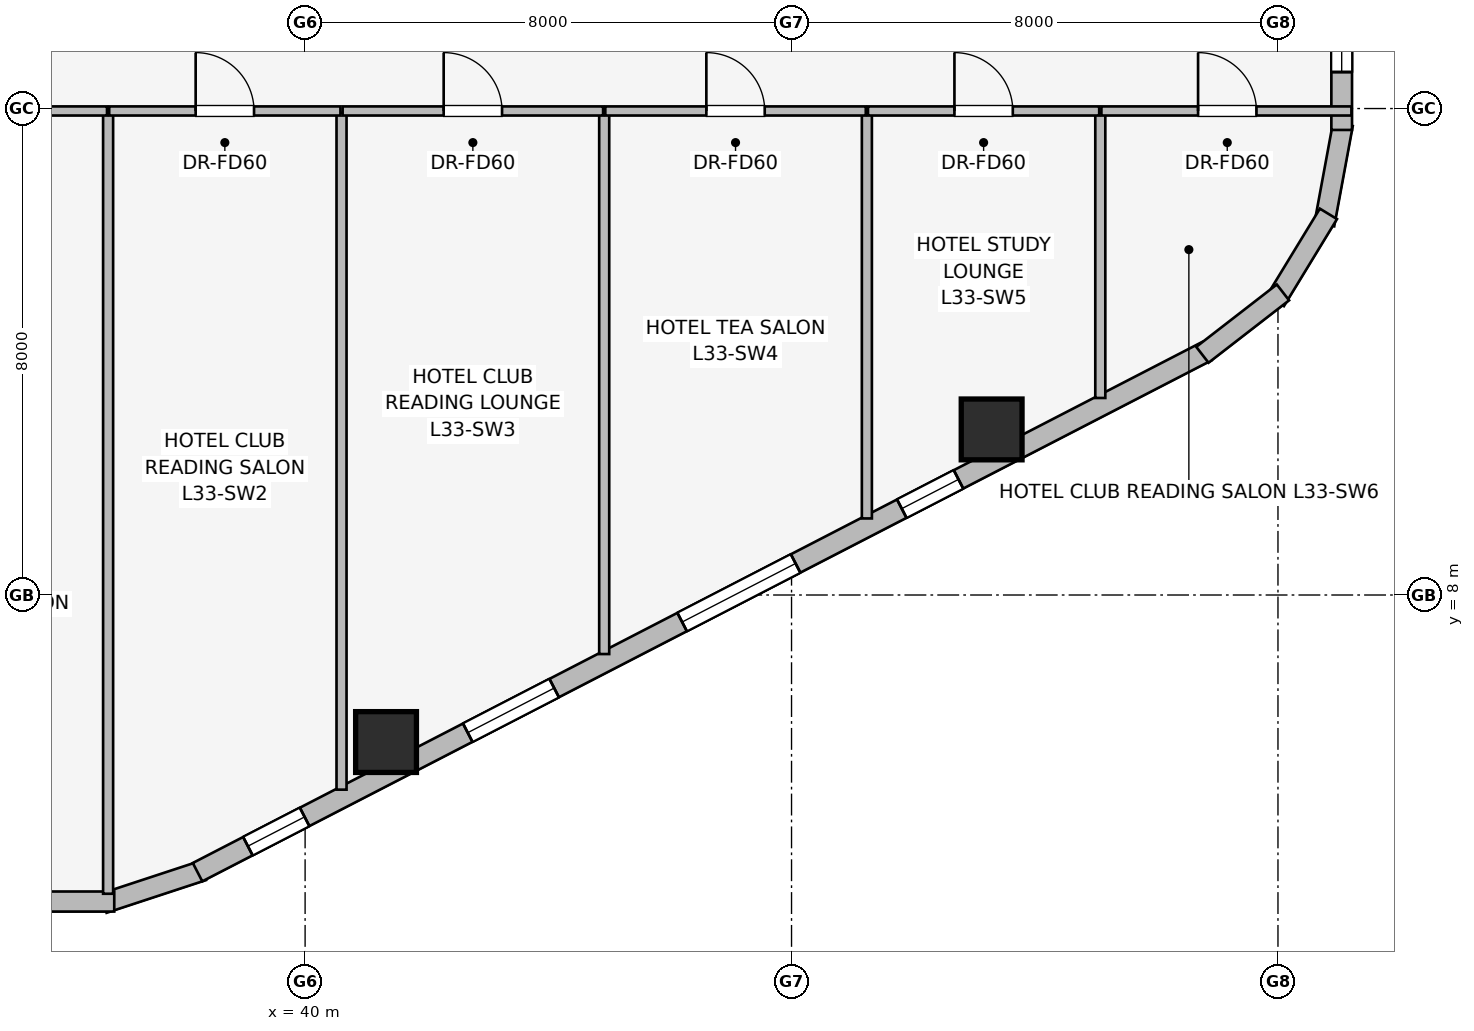
"""IFC4 building model, lengths in metres.
Left out: names, types, materials, properties, quantities, classifications, styles, units other than length and angle.
Written with IfcOpenShell. Run it as: python <this file> out.ifc"""

import sys

from ifc_helpers import new_model, si_unit, direction, frame, frame_2d, origin, origin_2d, place, context, subcontext, project, spatial, rectangle, extrude, element, fill, save


model = new_model("IFC4")
c1 = context("Model", 3, precision=1e-05, world=origin(), true_north=direction((0.0, 1.0)))
c2 = subcontext(c1, "Body", "Model", "MODEL_VIEW")
j1 = project(units=[si_unit("LENGTHUNIT", "METRE"), si_unit("PLANEANGLEUNIT", "RADIAN")], contexts=[c1])
p1 = place(None, origin())
s1 = spatial("IfcSite", under=j1, at=p1, CompositionType="ELEMENT")
p2 = place(p1, origin())
s2 = spatial("IfcBuilding", under=s1, at=p2, CompositionType="ELEMENT")
p3 = place(p2, frame((0.0, 0.0, 125.7)))
s3 = spatial("IfcBuildingStorey", under=s2, at=p3, CompositionType="ELEMENT", Elevation=125.7)
for number, where, z_axis, x_axis in (
    (1, (41.331, 5.582, 0.0), (0.0, 0.0, 1.0), (1.0, 0.0, 0.0)),
    (2, (51.291, 10.723, 0.0), (0.0, 0.0, 1.0), (1.0, 0.0, 0.0)),
):
    element("IfcColumn", number, at=place(p3, frame(where, z_axis=z_axis, x_axis=x_axis)), inside=s3, PredefinedType="COLUMN", context=c2, shape_type="SweptSolid", body=[
        extrude(rectangle(XDim=1.0, YDim=1.0, at=origin_2d()), origin(), (0.0, 0.0, 1.0), 3.45),
    ])
for number, where, z_axis, x_axis in (
    (3, (38.319, 3.468, 0.0), (0.0, 0.0, 1.0), (-0.95, -0.312, 0.0)),
    (4, (36.861, 2.959, 0.0), (0.0, 0.0, 1.0), (-1.0, 0.0, 0.0)),
):
    element("IfcWall", number, at=place(p3, frame(where, z_axis=z_axis, x_axis=x_axis)), inside=s3, PredefinedType="STANDARD", context=c2, shape_type="SweptSolid", body=[
        extrude(rectangle(XDim=1.722, YDim=0.33, at=frame_2d((0.861, 0.0))), origin(), (0.0, 0.0, 1.0), 3.19),
    ])
p4 = place(p3, frame((54.831, 12.01, 0.0), z_axis=(0.0, 0.0, 1.0), x_axis=(-0.888613612362, -0.458656568606, 0.0)))
e5 = element("IfcWall", 5, at=p4, inside=s3, PredefinedType="STANDARD", context=c2, shape_type="SweptSolid", body=[
    extrude(rectangle(XDim=18.681, YDim=0.34, at=frame_2d((9.34, 0.0))), origin(), (0.0, 0.0, 1.0), 3.19),
])
p5 = place(p4, frame((4.597, 0.0, 0.75)))
e6 = element("IfcOpeningElement", 6, at=p5, cuts=e5, PredefinedType="OPENING", context=c2, shape_type="SweptSolid", body=[
    extrude(rectangle(XDim=1.05, YDim=1.4, at=frame_2d((0.525, 0.7))), frame((0.0, 0.18, 0.0), z_axis=(0.0, -1.0, 0.0), x_axis=(1.0, 0.0, 0.0)), (0.0, 0.0, 1.0), 0.36),
])
p6 = place(p4, frame((7.612, 0.0, 0.75)))
e7 = element("IfcOpeningElement", 7, at=p6, cuts=e5, PredefinedType="OPENING", context=c2, shape_type="SweptSolid", body=[
    extrude(rectangle(XDim=2.1, YDim=1.5, at=frame_2d((1.05, 0.75))), frame((0.0, 0.18, 0.0), z_axis=(0.0, -1.0, 0.0), x_axis=(1.0, 0.0, 0.0)), (0.0, 0.0, 1.0), 0.36),
])
p7 = place(p4, frame((12.08, 0.0, 0.75)))
e8 = element("IfcOpeningElement", 8, at=p7, cuts=e5, PredefinedType="OPENING", context=c2, shape_type="SweptSolid", body=[
    extrude(rectangle(XDim=1.6, YDim=1.55, at=frame_2d((0.8, 0.775))), frame((0.0, 0.18, 0.0), z_axis=(0.0, -1.0, 0.0), x_axis=(1.0, 0.0, 0.0)), (0.0, 0.0, 1.0), 0.36),
])
p8 = place(p4, frame((16.699, 0.0, 0.75)))
e9 = element("IfcOpeningElement", 9, at=p8, cuts=e5, PredefinedType="OPENING", context=c2, shape_type="SweptSolid", body=[
    extrude(rectangle(XDim=1.05, YDim=1.4, at=frame_2d((0.525, 0.7))), frame((0.0, 0.18, 0.0), z_axis=(0.0, -1.0, 0.0), x_axis=(1.0, 0.0, 0.0)), (0.0, 0.0, 1.0), 0.36),
])
p9 = place(p3, frame((57.068, 15.742, 0.0), z_axis=(0.0, 0.0, 1.0), x_axis=(-0.181984991895, -0.983301308209, 0.0)))
e10 = element("IfcWall", 10, at=p9, inside=s3, PredefinedType="STANDARD", context=c2, shape_type="SweptSolid", body=[
    extrude(rectangle(XDim=1.677, YDim=0.33, at=frame_2d((0.838, 0.0))), origin(), (0.0, 0.0, 1.0), 3.19),
])
p10 = place(p3, frame((56.83, 14.268, 0.0), z_axis=(0.0, 0.0, 1.0), x_axis=(-0.520519429557, -0.853849824883, 0.0)))
e11 = element("IfcWall", 11, at=p10, inside=s3, PredefinedType="STANDARD", context=c2, shape_type="SweptSolid", body=[
    extrude(rectangle(XDim=1.677, YDim=0.33, at=frame_2d((0.839, 0.0))), origin(), (0.0, 0.0, 1.0), 3.19),
])
p11 = place(p3, frame((56.082, 12.976, 0.0), z_axis=(0.0, 0.0, 1.0), x_axis=(-0.790621329885, -0.612305408053, 0.0)))
e12 = element("IfcWall", 12, at=p11, inside=s3, PredefinedType="STANDARD", context=c2, shape_type="SweptSolid", body=[
    extrude(rectangle(XDim=1.676, YDim=0.33, at=frame_2d((0.838, 0.0))), origin(), (0.0, 0.0, 1.0), 3.19),
])
p12 = place(p3, frame((57.048, 32.352, 0.0), z_axis=(0.0, 0.0, 1.0), x_axis=(0.0, -1.0, 0.0)))
e13 = element("IfcWall", 13, at=p12, inside=s3, PredefinedType="STANDARD", context=c2, shape_type="SweptSolid", body=[
    extrude(rectangle(XDim=16.704, YDim=0.34, at=frame_2d((8.352, 0.0))), origin(), (0.0, 0.0, 1.0), 3.19),
])
p13 = place(p12, frame((8.452, 0.0, 0.0)))
e14 = element("IfcOpeningElement", 14, at=p13, cuts=e13, PredefinedType="OPENING", context=c2, shape_type="SweptSolid", body=[
    extrude(rectangle(XDim=1.1, YDim=2.04, at=frame_2d((0.55, 1.02))), frame((0.0, 0.18, 0.0), z_axis=(0.0, -1.0, 0.0), x_axis=(1.0, 0.0, 0.0)), (0.0, 0.0, 1.0), 0.36),
])
p14 = place(p12, frame((0.992, 0.0, 0.75)))
e15 = element("IfcOpeningElement", 15, at=p14, cuts=e13, PredefinedType="OPENING", context=c2, shape_type="SweptSolid", body=[
    extrude(rectangle(XDim=1.05, YDim=1.4, at=frame_2d((0.525, 0.7))), frame((0.0, 0.18, 0.0), z_axis=(0.0, -1.0, 0.0), x_axis=(1.0, 0.0, 0.0)), (0.0, 0.0, 1.0), 0.36),
])
p15 = place(p12, frame((4.935, 0.0, 0.75)))
e16 = element("IfcOpeningElement", 16, at=p15, cuts=e13, PredefinedType="OPENING", context=c2, shape_type="SweptSolid", body=[
    extrude(rectangle(XDim=2.1, YDim=1.5, at=frame_2d((1.05, 0.75))), frame((0.0, 0.18, 0.0), z_axis=(0.0, -1.0, 0.0), x_axis=(1.0, 0.0, 0.0)), (0.0, 0.0, 1.0), 0.36),
])
p16 = place(p12, frame((10.497, 0.0, 0.75)))
e17 = element("IfcOpeningElement", 17, at=p16, cuts=e13, PredefinedType="OPENING", context=c2, shape_type="SweptSolid", body=[
    extrude(rectangle(XDim=1.6, YDim=1.55, at=frame_2d((0.8, 0.775))), frame((0.0, 0.18, 0.0), z_axis=(0.0, -1.0, 0.0), x_axis=(1.0, 0.0, 0.0)), (0.0, 0.0, 1.0), 0.36),
])
p17 = place(p12, frame((14.702, 0.0, 0.75)))
e18 = element("IfcOpeningElement", 18, at=p17, cuts=e13, PredefinedType="OPENING", context=c2, shape_type="SweptSolid", body=[
    extrude(rectangle(XDim=1.05, YDim=1.4, at=frame_2d((0.525, 0.7))), frame((0.0, 0.18, 0.0), z_axis=(0.0, -1.0, 0.0), x_axis=(1.0, 0.0, 0.0)), (0.0, 0.0, 1.0), 0.36),
])
p18 = place(p3, frame((36.76, 3.087, 0.0), z_axis=(0.0, 0.0, 1.0), x_axis=(0.0, 1.0, 0.0)))
e19 = element("IfcWall", 19, at=p18, inside=s3, PredefinedType="PARTITIONING", context=c2, shape_type="SweptSolid", body=[
    extrude(rectangle(XDim=12.843, YDim=0.165, at=frame_2d((6.421, 0.0))), origin(), (0.0, 0.0, 1.0), 3.19),
])
p19 = place(p3, frame((40.599, 4.799, 0.0), z_axis=(0.0, 0.0, 1.0), x_axis=(0.0, 1.0, 0.0)))
e20 = element("IfcWall", 20, at=p19, inside=s3, PredefinedType="PARTITIONING", context=c2, shape_type="SweptSolid", body=[
    extrude(rectangle(XDim=11.131, YDim=0.165, at=frame_2d((5.565, 0.0))), origin(), (0.0, 0.0, 1.0), 2.42),
])
p20 = place(p3, frame((44.919, 7.029, 0.0), z_axis=(0.0, 0.0, 1.0), x_axis=(0.0, 1.0, 0.0)))
e21 = element("IfcWall", 21, at=p20, inside=s3, PredefinedType="PARTITIONING", context=c2, shape_type="SweptSolid", body=[
    extrude(rectangle(XDim=8.901, YDim=0.165, at=frame_2d((4.45, 0.0))), origin(), (0.0, 0.0, 1.0), 3.19),
])
p21 = place(p3, frame((49.239, 9.259, 0.0), z_axis=(0.0, 0.0, 1.0), x_axis=(0.0, 1.0, 0.0)))
e22 = element("IfcWall", 22, at=p21, inside=s3, PredefinedType="PARTITIONING", context=c2, shape_type="SweptSolid", body=[
    extrude(rectangle(XDim=6.671, YDim=0.165, at=frame_2d((3.335, 0.0))), origin(), (0.0, 0.0, 1.0), 3.19),
])
p22 = place(p3, frame((53.078, 11.24, 0.0), z_axis=(0.0, 0.0, 1.0), x_axis=(0.0, 1.0, 0.0)))
e23 = element("IfcWall", 23, at=p22, inside=s3, PredefinedType="PARTITIONING", context=c2, shape_type="SweptSolid", body=[
    extrude(rectangle(XDim=4.69, YDim=0.165, at=frame_2d((2.345, 0.0))), origin(), (0.0, 0.0, 1.0), 3.19),
])
p23 = place(p3, frame((32.85, 15.96, 0.0), z_axis=(0.0, 0.0, 1.0), x_axis=(1.0, 0.0, 0.0)))
e24 = element("IfcWall", 24, at=p23, inside=s3, PredefinedType="PARTITIONING", context=c2, shape_type="SweptSolid", body=[
    extrude(rectangle(XDim=3.892, YDim=0.15, at=frame_2d((1.946, 0.0))), origin(), (0.0, 0.0, 1.0), 3.19),
])
p24 = place(p23, frame((1.466, 0.0, 0.0)))
e25 = element("IfcOpeningElement", 25, at=p24, cuts=e24, PredefinedType="OPENING", context=c2, shape_type="SweptSolid", body=[
    extrude(rectangle(XDim=0.96, YDim=2.0, at=frame_2d((0.48, 1.0))), frame((0.0, 0.085, 0.0), z_axis=(0.0, -1.0, 0.0), x_axis=(1.0, 0.0, 0.0)), (0.0, 0.0, 1.0), 0.17),
])
p25 = place(p3, frame((36.778, 15.96, 0.0), z_axis=(0.0, 0.0, 1.0), x_axis=(1.0, 0.0, 0.0)))
e26 = element("IfcWall", 26, at=p25, inside=s3, PredefinedType="PARTITIONING", context=c2, shape_type="SweptSolid", body=[
    extrude(rectangle(XDim=3.803, YDim=0.15, at=frame_2d((1.901, 0.0))), origin(), (0.0, 0.0, 1.0), 3.19),
])
p26 = place(p25, frame((1.422, 0.0, 0.0)))
e27 = element("IfcOpeningElement", 27, at=p26, cuts=e26, PredefinedType="OPENING", context=c2, shape_type="SweptSolid", body=[
    extrude(rectangle(XDim=0.96, YDim=2.0, at=frame_2d((0.48, 1.0))), frame((0.0, 0.085, 0.0), z_axis=(0.0, -1.0, 0.0), x_axis=(1.0, 0.0, 0.0)), (0.0, 0.0, 1.0), 0.17),
])
p27 = place(p3, frame((40.617, 15.96, 0.0), z_axis=(0.0, 0.0, 1.0), x_axis=(1.0, 0.0, 0.0)))
e28 = element("IfcWall", 28, at=p27, inside=s3, PredefinedType="PARTITIONING", context=c2, shape_type="SweptSolid", body=[
    extrude(rectangle(XDim=4.284, YDim=0.15, at=frame_2d((2.142, 0.0))), origin(), (0.0, 0.0, 1.0), 3.19),
])
p28 = place(p27, frame((1.662, 0.0, 0.0)))
e29 = element("IfcOpeningElement", 29, at=p28, cuts=e28, PredefinedType="OPENING", context=c2, shape_type="SweptSolid", body=[
    extrude(rectangle(XDim=0.96, YDim=2.0, at=frame_2d((0.48, 1.0))), frame((0.0, 0.085, 0.0), z_axis=(0.0, -1.0, 0.0), x_axis=(1.0, 0.0, 0.0)), (0.0, 0.0, 1.0), 0.17),
])
p29 = place(p3, frame((44.937, 15.96, 0.0), z_axis=(0.0, 0.0, 1.0), x_axis=(1.0, 0.0, 0.0)))
e30 = element("IfcWall", 30, at=p29, inside=s3, PredefinedType="PARTITIONING", context=c2, shape_type="SweptSolid", body=[
    extrude(rectangle(XDim=4.284, YDim=0.15, at=frame_2d((2.142, 0.0))), origin(), (0.0, 0.0, 1.0), 3.19),
])
p30 = place(p29, frame((1.662, 0.0, 0.0)))
e31 = element("IfcOpeningElement", 31, at=p30, cuts=e30, PredefinedType="OPENING", context=c2, shape_type="SweptSolid", body=[
    extrude(rectangle(XDim=0.96, YDim=2.0, at=frame_2d((0.48, 1.0))), frame((0.0, 0.085, 0.0), z_axis=(0.0, -1.0, 0.0), x_axis=(1.0, 0.0, 0.0)), (0.0, 0.0, 1.0), 0.17),
])
p31 = place(p3, frame((49.257, 15.96, 0.0), z_axis=(0.0, 0.0, 1.0), x_axis=(1.0, 0.0, 0.0)))
e32 = element("IfcWall", 32, at=p31, inside=s3, PredefinedType="PARTITIONING", context=c2, shape_type="SweptSolid", body=[
    extrude(rectangle(XDim=3.803, YDim=0.15, at=frame_2d((1.901, 0.0))), origin(), (0.0, 0.0, 1.0), 3.19),
])
p32 = place(p31, frame((1.422, 0.0, 0.0)))
e33 = element("IfcOpeningElement", 33, at=p32, cuts=e32, PredefinedType="OPENING", context=c2, shape_type="SweptSolid", body=[
    extrude(rectangle(XDim=0.96, YDim=2.0, at=frame_2d((0.48, 1.0))), frame((0.0, 0.085, 0.0), z_axis=(0.0, -1.0, 0.0), x_axis=(1.0, 0.0, 0.0)), (0.0, 0.0, 1.0), 0.17),
])
p33 = place(p3, frame((53.096, 15.96, 0.0), z_axis=(0.0, 0.0, 1.0), x_axis=(1.0, 0.0, 0.0)))
e34 = element("IfcWall", 34, at=p33, inside=s3, PredefinedType="PARTITIONING", context=c2, shape_type="SweptSolid", body=[
    extrude(rectangle(XDim=4.112, YDim=0.15, at=frame_2d((2.056, 0.0))), origin(), (0.0, 0.0, 1.0), 3.19),
])
p34 = place(p33, frame((1.59, 0.0, 0.0)))
e35 = element("IfcOpeningElement", 35, at=p34, cuts=e34, PredefinedType="OPENING", context=c2, shape_type="SweptSolid", body=[
    extrude(rectangle(XDim=0.96, YDim=2.0, at=frame_2d((0.48, 1.0))), frame((0.0, 0.085, 0.0), z_axis=(0.0, -1.0, 0.0), x_axis=(1.0, 0.0, 0.0)), (0.0, 0.0, 1.0), 0.17),
])
p35 = place(p5, origin())
e36 = element("IfcWindow", 36, at=p35, inside=s3, PartitioningType="SINGLE_PANEL", PredefinedType="WINDOW", context=c2, shape_type="SweptSolid", body=[
    extrude(rectangle(XDim=1.05, YDim=1.4, at=frame_2d((0.525, 0.7))), frame((0.0, 0.03, 0.0), z_axis=(0.0, -1.0, 0.0), x_axis=(1.0, 0.0, 0.0)), (0.0, 0.0, 1.0), 0.06),
])
fill(e6, e36)
p36 = place(p6, origin())
e37 = element("IfcWindow", 37, at=p36, inside=s3, PartitioningType="SINGLE_PANEL", PredefinedType="WINDOW", context=c2, shape_type="SweptSolid", body=[
    extrude(rectangle(XDim=2.1, YDim=1.5, at=frame_2d((1.05, 0.75))), frame((0.0, 0.03, 0.0), z_axis=(0.0, -1.0, 0.0), x_axis=(1.0, 0.0, 0.0)), (0.0, 0.0, 1.0), 0.06),
])
fill(e7, e37)
p37 = place(p7, origin())
e38 = element("IfcWindow", 38, at=p37, inside=s3, PartitioningType="SINGLE_PANEL", PredefinedType="WINDOW", context=c2, shape_type="SweptSolid", body=[
    extrude(rectangle(XDim=1.6, YDim=1.55, at=frame_2d((0.8, 0.775))), frame((0.0, 0.03, 0.0), z_axis=(0.0, -1.0, 0.0), x_axis=(1.0, 0.0, 0.0)), (0.0, 0.0, 1.0), 0.06),
])
fill(e8, e38)
p38 = place(p8, origin())
e39 = element("IfcWindow", 39, at=p38, inside=s3, PartitioningType="SINGLE_PANEL", PredefinedType="WINDOW", context=c2, shape_type="SweptSolid", body=[
    extrude(rectangle(XDim=1.05, YDim=1.4, at=frame_2d((0.525, 0.7))), frame((0.0, 0.03, 0.0), z_axis=(0.0, -1.0, 0.0), x_axis=(1.0, 0.0, 0.0)), (0.0, 0.0, 1.0), 0.06),
])
fill(e9, e39)
p39 = place(p17, origin())
e40 = element("IfcWindow", 40, at=p39, inside=s3, PartitioningType="SINGLE_PANEL", PredefinedType="WINDOW", context=c2, shape_type="SweptSolid", body=[
    extrude(rectangle(XDim=1.05, YDim=1.4, at=frame_2d((0.525, 0.7))), frame((0.0, 0.03, 0.0), z_axis=(0.0, -1.0, 0.0), x_axis=(1.0, 0.0, 0.0)), (0.0, 0.0, 1.0), 0.06),
])
fill(e18, e40)
p40 = place(p26, origin())
e41 = element("IfcDoor", 41, at=p40, inside=s3, OperationType="SINGLE_SWING_LEFT", PredefinedType="DOOR", context=c2, shape_type="SweptSolid", body=[
    extrude(rectangle(XDim=0.96, YDim=2.0, at=frame_2d((0.48, 1.0))), frame((0.0, 0.025, 0.0), z_axis=(0.0, -1.0, 0.0), x_axis=(1.0, 0.0, 0.0)), (0.0, 0.0, 1.0), 0.05),
])
fill(e27, e41)
p41 = place(p28, origin())
e42 = element("IfcDoor", 42, at=p41, inside=s3, OperationType="SINGLE_SWING_LEFT", PredefinedType="DOOR", context=c2, shape_type="SweptSolid", body=[
    extrude(rectangle(XDim=0.96, YDim=2.0, at=frame_2d((0.48, 1.0))), frame((0.0, 0.025, 0.0), z_axis=(0.0, -1.0, 0.0), x_axis=(1.0, 0.0, 0.0)), (0.0, 0.0, 1.0), 0.05),
])
fill(e29, e42)
p42 = place(p30, origin())
e43 = element("IfcDoor", 43, at=p42, inside=s3, OperationType="SINGLE_SWING_LEFT", PredefinedType="DOOR", context=c2, shape_type="SweptSolid", body=[
    extrude(rectangle(XDim=0.96, YDim=2.0, at=frame_2d((0.48, 1.0))), frame((0.0, 0.025, 0.0), z_axis=(0.0, -1.0, 0.0), x_axis=(1.0, 0.0, 0.0)), (0.0, 0.0, 1.0), 0.05),
])
fill(e31, e43)
p43 = place(p32, origin())
e44 = element("IfcDoor", 44, at=p43, inside=s3, OperationType="SINGLE_SWING_LEFT", PredefinedType="DOOR", context=c2, shape_type="SweptSolid", body=[
    extrude(rectangle(XDim=0.96, YDim=2.0, at=frame_2d((0.48, 1.0))), frame((0.0, 0.025, 0.0), z_axis=(0.0, -1.0, 0.0), x_axis=(1.0, 0.0, 0.0)), (0.0, 0.0, 1.0), 0.05),
])
fill(e33, e44)
p44 = place(p34, origin())
e45 = element("IfcDoor", 45, at=p44, inside=s3, OperationType="SINGLE_SWING_LEFT", PredefinedType="DOOR", context=c2, shape_type="SweptSolid", body=[
    extrude(rectangle(XDim=0.96, YDim=2.0, at=frame_2d((0.48, 1.0))), frame((0.0, 0.025, 0.0), z_axis=(0.0, -1.0, 0.0), x_axis=(1.0, 0.0, 0.0)), (0.0, 0.0, 1.0), 0.05),
])
fill(e35, e45)
save(model, sys.argv[1])
